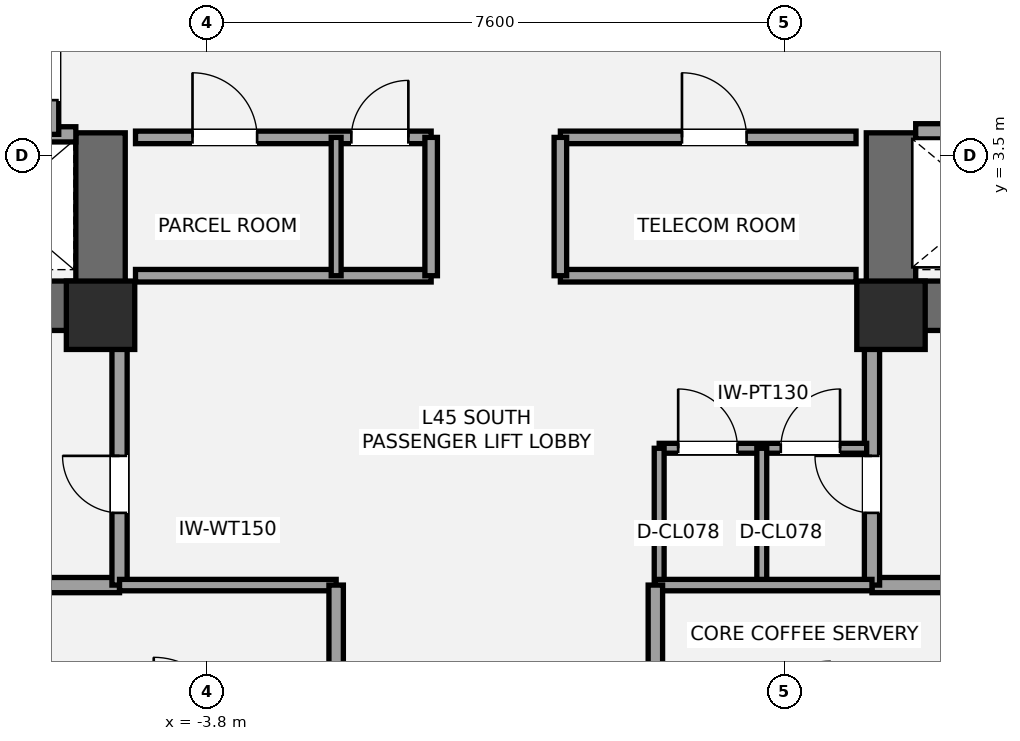
"""IFC4 building model, lengths in metres.
Left out: names, types, materials, properties, quantities, classifications, styles, units other than length and angle.
Written with IfcOpenShell. Run it as: python <this file> out.ifc"""

import sys

from ifc_helpers import new_model, si_unit, direction, frame, frame_2d, origin, origin_2d, place, context, subcontext, project, spatial, rectangle, extrude, element, fill, save


model = new_model("IFC4")
c1 = context("Model", 3, precision=1e-05, world=origin(), true_north=direction((0.0, 1.0)))
c2 = subcontext(c1, "Body", "Model", "MODEL_VIEW")
j1 = project(units=[si_unit("LENGTHUNIT", "METRE"), si_unit("PLANEANGLEUNIT", "RADIAN")], contexts=[c1])
p1 = place(None, origin())
s1 = spatial("IfcSite", under=j1, at=p1, CompositionType="ELEMENT")
p2 = place(p1, origin())
s2 = spatial("IfcBuilding", under=s1, at=p2, CompositionType="ELEMENT")
p3 = place(p2, frame((0.0, 0.0, 166.2)))
s3 = spatial("IfcBuildingStorey", under=s2, at=p3, CompositionType="ELEMENT", Elevation=166.2)
p4 = place(p3, frame((-4.875, 1.525, 0.0), z_axis=(0.0, 0.0, 1.0), x_axis=(-1.0, 0.0, 0.0)))
e1 = element("IfcWall", 1, at=p4, inside=s3, PredefinedType="SHEAR", context=c2, shape_type="SweptSolid", body=[
    extrude(rectangle(XDim=8.925, YDim=0.65, at=frame_2d((4.462, 0.0))), origin(), (0.0, 0.0, 1.0), 3.2),
])
p5 = place(p4, frame((5.425, 0.0, 0.0)))
e2 = element("IfcOpeningElement", 2, at=p5, cuts=e1, PredefinedType="OPENING", context=c2, shape_type="SweptSolid", body=[
    extrude(rectangle(XDim=1.05, YDim=2.15, at=frame_2d((0.525, 1.075))), frame((0.0, 0.335, 0.0), z_axis=(0.0, -1.0, 0.0), x_axis=(1.0, 0.0, 0.0)), (0.0, 0.0, 1.0), 0.67),
])
p6 = place(p4, frame((3.755, 0.0, 0.0)))
e3 = element("IfcOpeningElement", 3, at=p6, cuts=e1, PredefinedType="OPENING", context=c2, shape_type="SweptSolid", body=[
    extrude(rectangle(XDim=1.1, YDim=2.2, at=frame_2d((0.55, 1.1))), frame((0.0, 0.335, 0.0), z_axis=(0.0, -1.0, 0.0), x_axis=(1.0, 0.0, 0.0)), (0.0, 0.0, 1.0), 0.67),
])
p7 = place(p3, frame((-5.2, 1.2, 0.0), z_axis=(0.0, 0.0, 1.0), x_axis=(0.0, 1.0, 0.0)))
e4 = element("IfcWall", 4, at=p7, inside=s3, PredefinedType="SHEAR", context=c2, shape_type="SweptSolid", body=[
    extrude(rectangle(XDim=2.6, YDim=0.65, at=frame_2d((1.3, 0.0))), origin(), (0.0, 0.0, 1.0), 3.2),
])
p8 = place(p3, frame((13.8, 1.525, 0.0), z_axis=(0.0, 0.0, 1.0), x_axis=(-1.0, 0.0, 0.0)))
e5 = element("IfcWall", 5, at=p8, inside=s3, PredefinedType="SHEAR", context=c2, shape_type="SweptSolid", body=[
    extrude(rectangle(XDim=8.925, YDim=0.65, at=frame_2d((4.462, 0.0))), origin(), (0.0, 0.0, 1.0), 3.2),
])
p9 = place(p8, frame((2.45, 0.0, 0.0)))
e6 = element("IfcOpeningElement", 6, at=p9, cuts=e5, PredefinedType="OPENING", context=c2, shape_type="SweptSolid", body=[
    extrude(rectangle(XDim=1.05, YDim=2.15, at=frame_2d((0.525, 1.075))), frame((0.0, 0.335, 0.0), z_axis=(0.0, -1.0, 0.0), x_axis=(1.0, 0.0, 0.0)), (0.0, 0.0, 1.0), 0.67),
])
p10 = place(p8, frame((4.45, 0.0, 0.0)))
e7 = element("IfcOpeningElement", 7, at=p10, cuts=e5, PredefinedType="OPENING", context=c2, shape_type="SweptSolid", body=[
    extrude(rectangle(XDim=1.1, YDim=2.2, at=frame_2d((0.55, 1.1))), frame((0.0, 0.335, 0.0), z_axis=(0.0, -1.0, 0.0), x_axis=(1.0, 0.0, 0.0)), (0.0, 0.0, 1.0), 0.67),
])
p11 = place(p3, frame((5.2, 1.2, 0.0), z_axis=(0.0, 0.0, 1.0), x_axis=(0.0, 1.0, 0.0)))
e8 = element("IfcWall", 8, at=p11, inside=s3, PredefinedType="SHEAR", context=c2, shape_type="SweptSolid", body=[
    extrude(rectangle(XDim=2.6, YDim=0.65, at=frame_2d((1.3, 0.0))), origin(), (0.0, 0.0, 1.0), 3.2),
])
for number, where, z_axis, x_axis in (
    (9, (-5.2, 1.4, 0.0), (0.0, 0.0, 1.0), (1.0, 0.0, 0.0)),
    (10, (5.2, 1.4, 0.0), (0.0, 0.0, 1.0), (1.0, 0.0, 0.0)),
):
    element("IfcColumn", number, at=place(p3, frame(where, z_axis=z_axis, x_axis=x_axis)), inside=s3, PredefinedType="COLUMN", context=c2, shape_type="SweptSolid", body=[
        extrude(rectangle(XDim=0.9, YDim=0.9, at=origin_2d()), origin(), (0.0, 0.0, 1.0), 3.2),
    ])
p12 = place(p3, frame((-7.2, -2.15, 0.0), z_axis=(0.0, 0.0, 1.0), x_axis=(1.0, 0.0, 0.0)))
e11 = element("IfcWall", 11, at=p12, inside=s3, PredefinedType="SOLIDWALL", context=c2, shape_type="SweptSolid", body=[
    extrude(rectangle(XDim=2.25, YDim=0.2, at=frame_2d((1.125, 0.0))), origin(), (0.0, 0.0, 1.0), 3.02),
])
p13 = place(p3, frame((-4.95, -2.15, 0.0), z_axis=(0.0, 0.0, 1.0), x_axis=(0.0, 1.0, 0.0)))
e12 = element("IfcWall", 12, at=p13, inside=s3, PredefinedType="SOLIDWALL", context=c2, shape_type="SweptSolid", body=[
    extrude(rectangle(XDim=3.4, YDim=0.2, at=frame_2d((1.7, 0.0))), origin(), (0.0, 0.0, 1.0), 2.473),
])
p14 = place(p13, frame((0.95, 0.0, 0.0)))
e13 = element("IfcOpeningElement", 13, at=p14, cuts=e12, PredefinedType="OPENING", context=c2, shape_type="SweptSolid", body=[
    extrude(rectangle(XDim=0.75, YDim=2.1, at=frame_2d((0.375, 1.05))), frame((0.0, 0.11, 0.0), z_axis=(0.0, -1.0, 0.0), x_axis=(1.0, 0.0, 0.0)), (0.0, 0.0, 1.0), 0.22),
])
p15 = place(p3, frame((4.95, -2.15, 0.0), z_axis=(0.0, 0.0, 1.0), x_axis=(1.0, 0.0, 0.0)))
e14 = element("IfcWall", 14, at=p15, inside=s3, PredefinedType="SOLIDWALL", context=c2, shape_type="SweptSolid", body=[
    extrude(rectangle(XDim=2.25, YDim=0.2, at=frame_2d((1.125, 0.0))), origin(), (0.0, 0.0, 1.0), 3.02),
])
p16 = place(p3, frame((4.95, -2.15, 0.0), z_axis=(0.0, 0.0, 1.0), x_axis=(0.0, 1.0, 0.0)))
e15 = element("IfcWall", 15, at=p16, inside=s3, PredefinedType="SOLIDWALL", context=c2, shape_type="SweptSolid", body=[
    extrude(rectangle(XDim=3.4, YDim=0.2, at=frame_2d((1.7, 0.0))), origin(), (0.0, 0.0, 1.0), 2.473),
])
p17 = place(p16, frame((0.95, 0.0, 0.0)))
e16 = element("IfcOpeningElement", 16, at=p17, cuts=e15, PredefinedType="OPENING", context=c2, shape_type="SweptSolid", body=[
    extrude(rectangle(XDim=0.75, YDim=2.1, at=frame_2d((0.375, 1.05))), frame((0.0, 0.11, 0.0), z_axis=(0.0, -1.0, 0.0), x_axis=(1.0, 0.0, 0.0)), (0.0, 0.0, 1.0), 0.22),
])
p18 = place(p3, frame((2.15, -0.35, 0.0), z_axis=(0.0, 0.0, 1.0), x_axis=(1.0, 0.0, 0.0)))
e17 = element("IfcWall", 17, at=p18, inside=s3, PredefinedType="PARTITIONING", context=c2, shape_type="SweptSolid", body=[
    extrude(rectangle(XDim=2.73, YDim=0.13, at=frame_2d((1.365, 0.0))), origin(), (0.0, 0.0, 1.0), 3.02),
])
p19 = place(p18, frame((0.25, 0.0, 0.0)))
e18 = element("IfcOpeningElement", 18, at=p19, cuts=e17, PredefinedType="OPENING", context=c2, shape_type="SweptSolid", body=[
    extrude(rectangle(XDim=0.78, YDim=2.1, at=frame_2d((0.39, 1.05))), frame((0.0, 0.075, 0.0), z_axis=(0.0, -1.0, 0.0), x_axis=(1.0, 0.0, 0.0)), (0.0, 0.0, 1.0), 0.15),
])
p20 = place(p18, frame((1.6, 0.0, 0.0)))
e19 = element("IfcOpeningElement", 19, at=p20, cuts=e17, PredefinedType="OPENING", context=c2, shape_type="SweptSolid", body=[
    extrude(rectangle(XDim=0.78, YDim=2.1, at=frame_2d((0.39, 1.05))), frame((0.0, 0.075, 0.0), z_axis=(0.0, -1.0, 0.0), x_axis=(1.0, 0.0, 0.0)), (0.0, 0.0, 1.0), 0.15),
])
p21 = place(p3, frame((2.15, -2.15, 0.0), z_axis=(0.0, 0.0, 1.0), x_axis=(0.0, 1.0, 0.0)))
e20 = element("IfcWall", 20, at=p21, inside=s3, PredefinedType="PARTITIONING", context=c2, shape_type="SweptSolid", body=[
    extrude(rectangle(XDim=1.8, YDim=0.13, at=frame_2d((0.9, 0.0))), origin(), (0.0, 0.0, 1.0), 3.02),
])
p22 = place(p3, frame((3.5, -2.15, 0.0), z_axis=(0.0, 0.0, 1.0), x_axis=(0.0, 1.0, 0.0)))
e21 = element("IfcWall", 21, at=p22, inside=s3, PredefinedType="PARTITIONING", context=c2, shape_type="SweptSolid", body=[
    extrude(rectangle(XDim=1.8, YDim=0.13, at=frame_2d((0.9, 0.0))), origin(), (0.0, 0.0, 1.0), 2.473),
])
p23 = place(p3, frame((-9.78, 3.78, 0.0), z_axis=(0.0, 0.0, 1.0), x_axis=(1.0, 0.0, 0.0)))
e22 = element("IfcWall", 22, at=p23, inside=s3, PredefinedType="SOLIDWALL", context=c2, shape_type="SweptSolid", body=[
    extrude(rectangle(XDim=4.255, YDim=0.2, at=frame_2d((2.127, 0.0))), origin(), (0.0, 0.0, 1.0), 3.02),
])
p24 = place(p3, frame((-5.85, 3.78, 0.0), z_axis=(0.0, 0.0, 1.0), x_axis=(0.0, 1.0, 0.0)))
e23 = element("IfcWall", 23, at=p24, inside=s3, PredefinedType="SOLIDWALL", context=c2, shape_type="SweptSolid", body=[
    extrude(rectangle(XDim=1.69, YDim=0.2, at=frame_2d((0.845, 0.0))), origin(), (0.0, 0.0, 1.0), 3.02),
])
p25 = place(p24, frame((0.45, 0.0, 0.0)))
e24 = element("IfcOpeningElement", 24, at=p25, cuts=e23, PredefinedType="OPENING", context=c2, shape_type="SweptSolid", body=[
    extrude(rectangle(XDim=0.75, YDim=2.1, at=frame_2d((0.375, 1.05))), frame((0.0, 0.11, 0.0), z_axis=(0.0, -1.0, 0.0), x_axis=(1.0, 0.0, 0.0)), (0.0, 0.0, 1.0), 0.22),
])
p26 = place(p3, frame((5.525, 3.82, 0.0), z_axis=(0.0, 0.0, 1.0), x_axis=(1.0, 0.0, 0.0)))
e25 = element("IfcWall", 25, at=p26, inside=s3, PredefinedType="SOLIDWALL", context=c2, shape_type="SweptSolid", body=[
    extrude(rectangle(XDim=4.255, YDim=0.2, at=frame_2d((2.127, 0.0))), origin(), (0.0, 0.0, 1.0), 3.02),
])
p27 = place(p26, frame((0.65, 0.0, 0.0)))
e26 = element("IfcOpeningElement", 26, at=p27, cuts=e25, PredefinedType="OPENING", context=c2, shape_type="SweptSolid", body=[
    extrude(rectangle(XDim=1.2, YDim=2.2, at=frame_2d((0.6, 1.1))), frame((0.0, 0.11, 0.0), z_axis=(0.0, -1.0, 0.0), x_axis=(1.0, 0.0, 0.0)), (0.0, 0.0, 1.0), 0.22),
])
p28 = place(p3, frame((-4.74, 1.92, 0.0), z_axis=(0.0, 0.0, 1.0), x_axis=(1.0, 0.0, 0.0)))
e27 = element("IfcWall", 27, at=p28, inside=s3, PredefinedType="PARTITIONING", context=c2, shape_type="SweptSolid", body=[
    extrude(rectangle(XDim=3.89, YDim=0.165, at=frame_2d((1.945, 0.0))), origin(), (0.0, 0.0, 1.0), 2.16),
])
p29 = place(p3, frame((-4.74, 3.74, 0.0), z_axis=(0.0, 0.0, 1.0), x_axis=(1.0, 0.0, 0.0)))
e28 = element("IfcWall", 28, at=p29, inside=s3, PredefinedType="PARTITIONING", context=c2, shape_type="SweptSolid", body=[
    extrude(rectangle(XDim=3.89, YDim=0.165, at=frame_2d((1.945, 0.0))), origin(), (0.0, 0.0, 1.0), 3.02),
])
p30 = place(p29, frame((0.75, 0.0, 0.0)))
e29 = element("IfcOpeningElement", 29, at=p30, cuts=e28, PredefinedType="OPENING", context=c2, shape_type="SweptSolid", body=[
    extrude(rectangle(XDim=0.85, YDim=2.1, at=frame_2d((0.425, 1.05))), frame((0.0, 0.093, 0.0), z_axis=(0.0, -1.0, 0.0), x_axis=(1.0, 0.0, 0.0)), (0.0, 0.0, 1.0), 0.185),
])
p31 = place(p29, frame((2.84, 0.0, 0.0)))
e30 = element("IfcOpeningElement", 30, at=p31, cuts=e28, PredefinedType="OPENING", context=c2, shape_type="SweptSolid", body=[
    extrude(rectangle(XDim=0.75, YDim=2.1, at=frame_2d((0.375, 1.05))), frame((0.0, 0.093, 0.0), z_axis=(0.0, -1.0, 0.0), x_axis=(1.0, 0.0, 0.0)), (0.0, 0.0, 1.0), 0.185),
])
p32 = place(p3, frame((-0.85, 1.92, 0.0), z_axis=(0.0, 0.0, 1.0), x_axis=(0.0, 1.0, 0.0)))
e31 = element("IfcWall", 31, at=p32, inside=s3, PredefinedType="PARTITIONING", context=c2, shape_type="SweptSolid", body=[
    extrude(rectangle(XDim=1.82, YDim=0.165, at=frame_2d((0.91, 0.0))), origin(), (0.0, 0.0, 1.0), 3.02),
])
p33 = place(p3, frame((0.85, 1.92, 0.0), z_axis=(0.0, 0.0, 1.0), x_axis=(1.0, 0.0, 0.0)))
e32 = element("IfcWall", 32, at=p33, inside=s3, PredefinedType="PARTITIONING", context=c2, shape_type="SweptSolid", body=[
    extrude(rectangle(XDim=3.89, YDim=0.165, at=frame_2d((1.945, 0.0))), origin(), (0.0, 0.0, 1.0), 2.16),
])
p34 = place(p3, frame((0.85, 3.74, 0.0), z_axis=(0.0, 0.0, 1.0), x_axis=(1.0, 0.0, 0.0)))
e33 = element("IfcWall", 33, at=p34, inside=s3, PredefinedType="PARTITIONING", context=c2, shape_type="SweptSolid", body=[
    extrude(rectangle(XDim=3.89, YDim=0.165, at=frame_2d((1.945, 0.0))), origin(), (0.0, 0.0, 1.0), 3.02),
])
p35 = place(p34, frame((1.6, 0.0, 0.0)))
e34 = element("IfcOpeningElement", 34, at=p35, cuts=e33, PredefinedType="OPENING", context=c2, shape_type="SweptSolid", body=[
    extrude(rectangle(XDim=0.85, YDim=2.1, at=frame_2d((0.425, 1.05))), frame((0.0, 0.093, 0.0), z_axis=(0.0, -1.0, 0.0), x_axis=(1.0, 0.0, 0.0)), (0.0, 0.0, 1.0), 0.185),
])
p36 = place(p3, frame((0.85, 1.92, 0.0), z_axis=(0.0, 0.0, 1.0), x_axis=(0.0, 1.0, 0.0)))
e35 = element("IfcWall", 35, at=p36, inside=s3, PredefinedType="PARTITIONING", context=c2, shape_type="SweptSolid", body=[
    extrude(rectangle(XDim=1.82, YDim=0.165, at=frame_2d((0.91, 0.0))), origin(), (0.0, 0.0, 1.0), 3.02),
])
p37 = place(p3, frame((-2.1, 1.92, 0.0), z_axis=(0.0, 0.0, 1.0), x_axis=(0.0, 1.0, 0.0)))
e36 = element("IfcWall", 36, at=p37, inside=s3, PredefinedType="PARTITIONING", context=c2, shape_type="SweptSolid", body=[
    extrude(rectangle(XDim=1.82, YDim=0.13, at=frame_2d((0.91, 0.0))), origin(), (0.0, 0.0, 1.0), 3.02),
])
p38 = place(p3, frame((-4.95, -2.15, 0.0), z_axis=(0.0, 0.0, 1.0), x_axis=(1.0, 0.0, 0.0)))
e37 = element("IfcWall", 37, at=p38, inside=s3, PredefinedType="PLUMBINGWALL", context=c2, shape_type="SweptSolid", body=[
    extrude(rectangle(XDim=2.85, YDim=0.15, at=frame_2d((1.425, 0.0))), origin(), (0.0, 0.0, 1.0), 2.473),
])
p39 = place(p3, frame((-2.1, -4.05, 0.0), z_axis=(0.0, 0.0, 1.0), x_axis=(0.0, 1.0, 0.0)))
e38 = element("IfcWall", 38, at=p39, inside=s3, PredefinedType="PLUMBINGWALL", context=c2, shape_type="SweptSolid", body=[
    extrude(rectangle(XDim=1.9, YDim=0.19, at=frame_2d((0.95, 0.0))), origin(), (0.0, 0.0, 1.0), 2.473),
])
p40 = place(p3, frame((2.1, -2.15, 0.0), z_axis=(0.0, 0.0, 1.0), x_axis=(1.0, 0.0, 0.0)))
e39 = element("IfcWall", 39, at=p40, inside=s3, PredefinedType="PLUMBINGWALL", context=c2, shape_type="SweptSolid", body=[
    extrude(rectangle(XDim=2.85, YDim=0.15, at=frame_2d((1.425, 0.0))), origin(), (0.0, 0.0, 1.0), 3.02),
])
p41 = place(p3, frame((2.1, -4.05, 0.0), z_axis=(0.0, 0.0, 1.0), x_axis=(0.0, 1.0, 0.0)))
e40 = element("IfcWall", 40, at=p41, inside=s3, PredefinedType="PLUMBINGWALL", context=c2, shape_type="SweptSolid", body=[
    extrude(rectangle(XDim=1.9, YDim=0.19, at=frame_2d((0.95, 0.0))), origin(), (0.0, 0.0, 1.0), 2.473),
])
p42 = place(p14, origin())
e41 = element("IfcDoor", 41, at=p42, inside=s3, OperationType="SINGLE_SWING_RIGHT", PredefinedType="DOOR", context=c2, shape_type="SweptSolid", body=[
    extrude(rectangle(XDim=0.75, YDim=2.1, at=frame_2d((0.375, 1.05))), frame((0.0, 0.025, 0.0), z_axis=(0.0, -1.0, 0.0), x_axis=(1.0, 0.0, 0.0)), (0.0, 0.0, 1.0), 0.05),
])
fill(e13, e41)
p43 = place(p17, origin())
e42 = element("IfcDoor", 42, at=p43, inside=s3, OperationType="SINGLE_SWING_RIGHT", PredefinedType="DOOR", context=c2, shape_type="SweptSolid", body=[
    extrude(rectangle(XDim=0.75, YDim=2.1, at=frame_2d((0.375, 1.05))), frame((0.0, 0.025, 0.0), z_axis=(0.0, -1.0, 0.0), x_axis=(1.0, 0.0, 0.0)), (0.0, 0.0, 1.0), 0.05),
])
fill(e16, e42)
p44 = place(p19, origin())
e43 = element("IfcDoor", 43, at=p44, inside=s3, OperationType="SINGLE_SWING_LEFT", PredefinedType="DOOR", context=c2, shape_type="SweptSolid", body=[
    extrude(rectangle(XDim=0.78, YDim=2.1, at=frame_2d((0.39, 1.05))), frame((0.0, 0.025, 0.0), z_axis=(0.0, -1.0, 0.0), x_axis=(1.0, 0.0, 0.0)), (0.0, 0.0, 1.0), 0.05),
])
fill(e18, e43)
p45 = place(p20, origin())
e44 = element("IfcDoor", 44, at=p45, inside=s3, OperationType="SINGLE_SWING_RIGHT", PredefinedType="DOOR", context=c2, shape_type="SweptSolid", body=[
    extrude(rectangle(XDim=0.78, YDim=2.1, at=frame_2d((0.39, 1.05))), frame((0.0, 0.025, 0.0), z_axis=(0.0, -1.0, 0.0), x_axis=(1.0, 0.0, 0.0)), (0.0, 0.0, 1.0), 0.05),
])
fill(e19, e44)
p46 = place(p25, origin())
e45 = element("IfcDoor", 45, at=p46, inside=s3, OperationType="SINGLE_SWING_RIGHT", PredefinedType="DOOR", context=c2, shape_type="SweptSolid", body=[
    extrude(rectangle(XDim=0.75, YDim=2.1, at=frame_2d((0.375, 1.05))), frame((0.0, 0.025, 0.0), z_axis=(0.0, -1.0, 0.0), x_axis=(1.0, 0.0, 0.0)), (0.0, 0.0, 1.0), 0.05),
])
fill(e24, e45)
p47 = place(p30, origin())
e46 = element("IfcDoor", 46, at=p47, inside=s3, OperationType="SINGLE_SWING_LEFT", PredefinedType="DOOR", context=c2, shape_type="SweptSolid", body=[
    extrude(rectangle(XDim=0.85, YDim=2.1, at=frame_2d((0.425, 1.05))), frame((0.0, 0.025, 0.0), z_axis=(0.0, -1.0, 0.0), x_axis=(1.0, 0.0, 0.0)), (0.0, 0.0, 1.0), 0.05),
])
fill(e29, e46)
p48 = place(p31, origin())
e47 = element("IfcDoor", 47, at=p48, inside=s3, OperationType="SINGLE_SWING_RIGHT", PredefinedType="DOOR", context=c2, shape_type="SweptSolid", body=[
    extrude(rectangle(XDim=0.75, YDim=2.1, at=frame_2d((0.375, 1.05))), frame((0.0, 0.025, 0.0), z_axis=(0.0, -1.0, 0.0), x_axis=(1.0, 0.0, 0.0)), (0.0, 0.0, 1.0), 0.05),
])
fill(e30, e47)
p49 = place(p35, origin())
e48 = element("IfcDoor", 48, at=p49, inside=s3, OperationType="SINGLE_SWING_LEFT", PredefinedType="DOOR", context=c2, shape_type="SweptSolid", body=[
    extrude(rectangle(XDim=0.85, YDim=2.1, at=frame_2d((0.425, 1.05))), frame((0.0, 0.025, 0.0), z_axis=(0.0, -1.0, 0.0), x_axis=(1.0, 0.0, 0.0)), (0.0, 0.0, 1.0), 0.05),
])
fill(e34, e48)
save(model, sys.argv[1])
